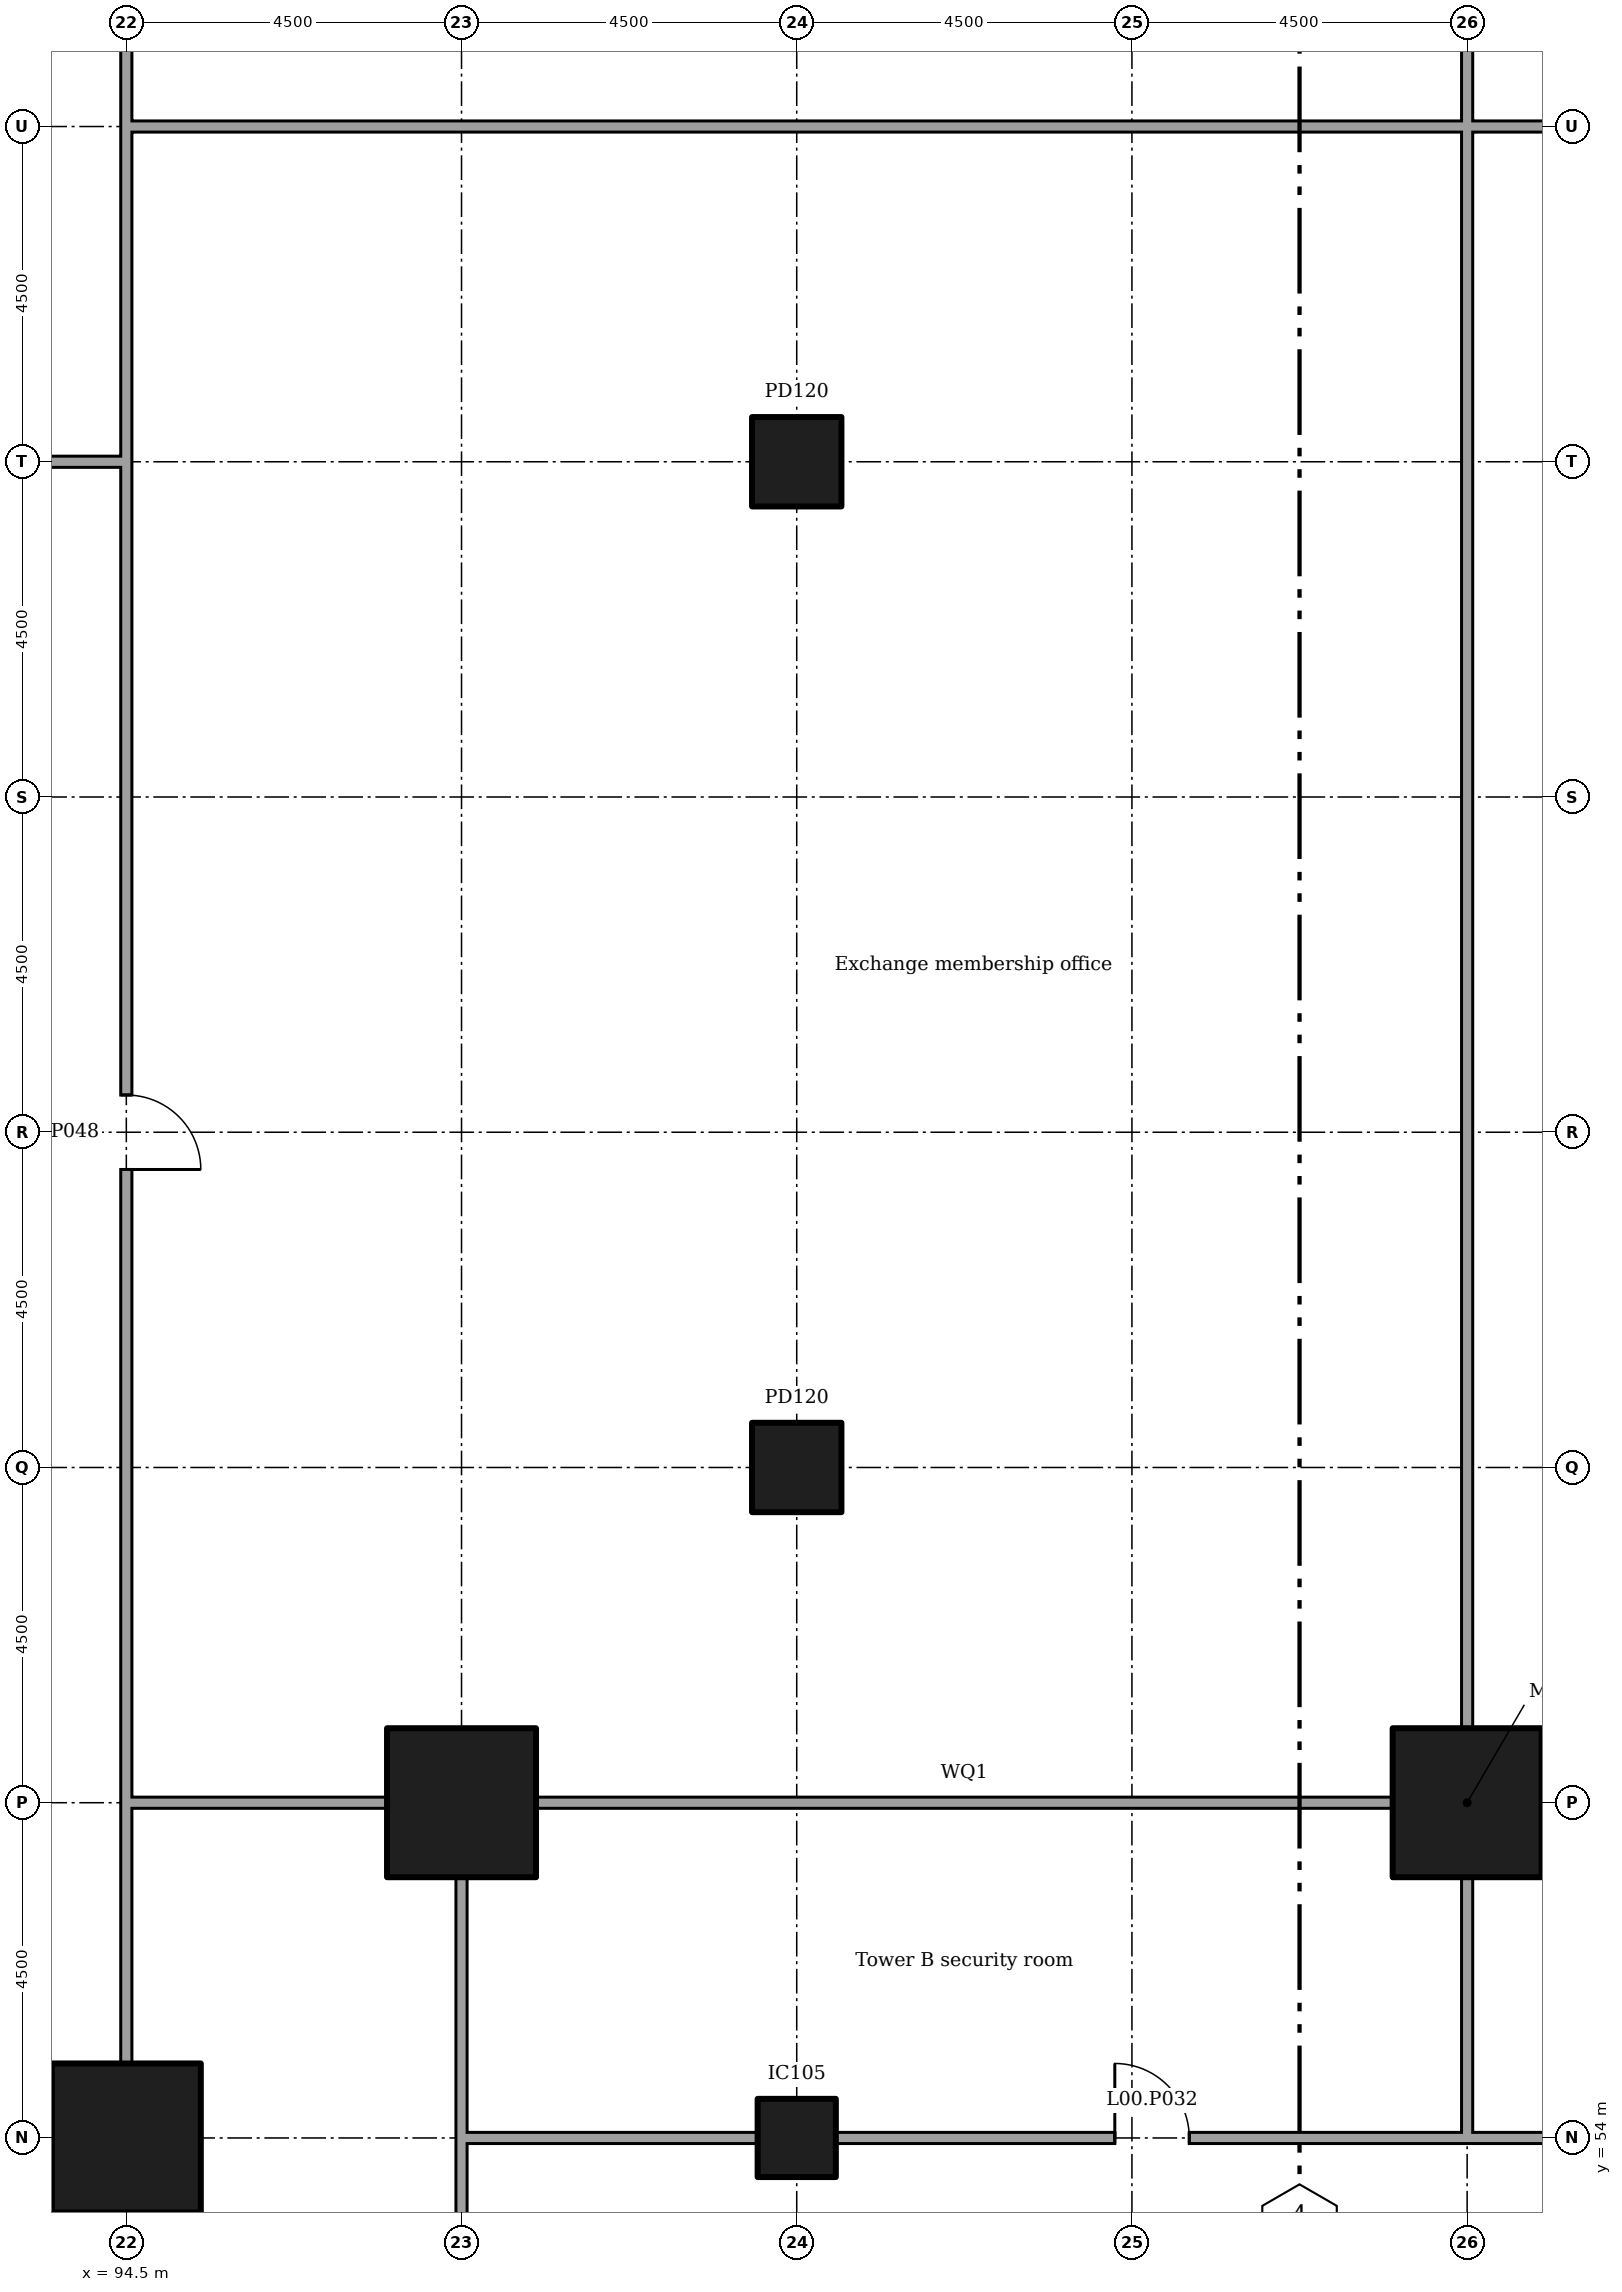
"""IFC4 building model, lengths in metres.
Left out: names, types, materials, properties, quantities, classifications, styles, units other than length and angle.
Written with IfcOpenShell. Run it as: python <this file> out.ifc"""

import sys

from ifc_helpers import new_model, si_unit, direction, frame, frame_2d, origin, origin_2d, place, context, subcontext, project, spatial, rectangle, extrude, element, fill, save


model = new_model("IFC4")
c1 = context("Model", 3, precision=1e-05, world=origin(), true_north=direction((0.0, 1.0)))
c2 = subcontext(c1, "Body", "Model", "MODEL_VIEW")
j1 = project(units=[si_unit("LENGTHUNIT", "METRE"), si_unit("PLANEANGLEUNIT", "RADIAN")], contexts=[c1])
p1 = place(None, origin())
s1 = spatial("IfcSite", under=j1, at=p1, CompositionType="ELEMENT")
p2 = place(p1, origin())
s2 = spatial("IfcBuilding", under=s1, at=p2, CompositionType="ELEMENT")
p3 = place(p2, origin())
s3 = spatial("IfcBuildingStorey", under=s2, at=p3, CompositionType="ELEMENT", Elevation=0.0)
for number, where in (
    (1, (94.5, 54.0, 0.0)),
    (2, (99.0, 58.5, 0.0)),
    (3, (112.5, 58.5, 0.0)),
):
    element("IfcColumn", number, at=place(p3, frame(where)), inside=s3, PredefinedType="COLUMN", context=c2, shape_type="SweptSolid", body=[
        extrude(rectangle(XDim=2.0, YDim=2.0, at=origin_2d()), origin(), (0.0, 0.0, 1.0), 6.0),
    ])
p4 = place(p3, frame((103.5, 54.0, 0.0)))
e4 = element("IfcColumn", 4, at=p4, inside=s3, PredefinedType="COLUMN", context=c2, shape_type="SweptSolid", body=[
    extrude(rectangle(XDim=1.05, YDim=1.05, at=origin_2d()), origin(), (0.0, 0.0, 1.0), 6.0),
])
for number, where in (
    (5, (103.5, 63.0, 0.0)),
    (6, (103.5, 76.5, 0.0)),
):
    element("IfcColumn", number, at=place(p3, frame(where)), inside=s3, PredefinedType="COLUMN", context=c2, shape_type="SweptSolid", body=[
        extrude(rectangle(XDim=1.2, YDim=1.2, at=origin_2d()), origin(), (0.0, 0.0, 1.0), 6.0),
    ])
p5 = place(p3, frame((90.595, 76.5, 0.0)))
e7 = element("IfcWall", 7, at=p5, inside=s3, PredefinedType="PARTITIONING", context=c2, shape_type="SweptSolid", body=[
    extrude(rectangle(XDim=3.98, YDim=0.15, at=frame_2d((1.99, 0.0))), origin(), (0.0, 0.0, 1.0), 5.55),
])
p6 = place(p3, frame((94.5, 45.995, 0.0), z_axis=(0.0, 0.0, 1.0), x_axis=(0.0, 1.0, 0.0)))
e8 = element("IfcWall", 8, at=p6, inside=s3, PredefinedType="PARTITIONING", context=c2, shape_type="SweptSolid", body=[
    extrude(rectangle(XDim=7.01, YDim=0.15, at=frame_2d((3.505, 0.0))), origin(), (0.0, 0.0, 1.0), 5.55),
])
p7 = place(p6, frame((2.6, 0.0, 0.0)))
e9 = element("IfcOpeningElement", 9, at=p7, cuts=e8, PredefinedType="OPENING", context=c2, shape_type="SweptSolid", body=[
    extrude(rectangle(XDim=1.8, YDim=2.1, at=frame_2d((0.9, 1.05))), frame((0.0, 0.085, 0.0), z_axis=(0.0, -1.0, 0.0), x_axis=(1.0, 0.0, 0.0)), (0.0, 0.0, 1.0), 0.17),
])
p8 = place(p3, frame((94.5, 54.995, 0.0), z_axis=(0.0, 0.0, 1.0), x_axis=(0.0, 1.0, 0.0)))
e10 = element("IfcWall", 10, at=p8, inside=s3, PredefinedType="PARTITIONING", context=c2, shape_type="SweptSolid", body=[
    extrude(rectangle(XDim=3.58, YDim=0.15, at=frame_2d((1.79, 0.0))), origin(), (0.0, 0.0, 1.0), 5.55),
])
p9 = place(p3, frame((94.5, 58.5, 0.0), z_axis=(0.0, 0.0, 1.0), x_axis=(0.0, 1.0, 0.0)))
e11 = element("IfcWall", 11, at=p9, inside=s3, PredefinedType="PARTITIONING", context=c2, shape_type="SweptSolid", body=[
    extrude(rectangle(XDim=17.925, YDim=0.15, at=frame_2d((8.962, 0.0))), origin(), (0.0, 0.0, 1.0), 5.55),
])
p10 = place(p9, frame((8.5, 0.0, 0.0)))
e12 = element("IfcOpeningElement", 12, at=p10, cuts=e11, PredefinedType="OPENING", context=c2, shape_type="SweptSolid", body=[
    extrude(rectangle(XDim=1.0, YDim=2.1, at=frame_2d((0.5, 1.05))), frame((0.0, 0.085, 0.0), z_axis=(0.0, -1.0, 0.0), x_axis=(1.0, 0.0, 0.0)), (0.0, 0.0, 1.0), 0.17),
])
p11 = place(p3, frame((94.5, 76.5, 0.0), z_axis=(0.0, 0.0, 1.0), x_axis=(0.0, 1.0, 0.0)))
e13 = element("IfcWall", 13, at=p11, inside=s3, PredefinedType="PARTITIONING", context=c2, shape_type="SweptSolid", body=[
    extrude(rectangle(XDim=4.575, YDim=0.15, at=frame_2d((2.288, 0.0))), origin(), (0.0, 0.0, 1.0), 5.55),
])
p12 = place(p3, frame((94.5, 81.0, 0.0), z_axis=(0.0, 0.0, 1.0), x_axis=(0.0, 1.0, 0.0)))
e14 = element("IfcWall", 14, at=p12, inside=s3, PredefinedType="PARTITIONING", context=c2, shape_type="SweptSolid", body=[
    extrude(rectangle(XDim=9.075, YDim=0.15, at=frame_2d((4.538, 0.0))), origin(), (0.0, 0.0, 1.0), 5.55),
])
p13 = place(p12, frame((3.6, 0.0, 0.0)))
e15 = element("IfcOpeningElement", 15, at=p13, cuts=e14, PredefinedType="OPENING", context=c2, shape_type="SweptSolid", body=[
    extrude(rectangle(XDim=1.8, YDim=2.1, at=frame_2d((0.9, 1.05))), frame((0.0, 0.085, 0.0), z_axis=(0.0, -1.0, 0.0), x_axis=(1.0, 0.0, 0.0)), (0.0, 0.0, 1.0), 0.17),
])
p14 = place(p3, frame((99.0, 36.52, 0.0), z_axis=(0.0, 0.0, 1.0), x_axis=(0.0, 1.0, 0.0)))
e16 = element("IfcWall", 16, at=p14, inside=s3, PredefinedType="PARTITIONING", context=c2, shape_type="SweptSolid", body=[
    extrude(rectangle(XDim=17.555, YDim=0.15, at=frame_2d((8.777, 0.0))), origin(), (0.0, 0.0, 1.0), 5.55),
])
p15 = place(p14, frame((7.85, 0.0, 0.0)))
e17 = element("IfcOpeningElement", 17, at=p15, cuts=e16, PredefinedType="OPENING", context=c2, shape_type="SweptSolid", body=[
    extrude(rectangle(XDim=1.8, YDim=2.1, at=frame_2d((0.9, 1.05))), frame((0.0, 0.085, 0.0), z_axis=(0.0, -1.0, 0.0), x_axis=(1.0, 0.0, 0.0)), (0.0, 0.0, 1.0), 0.17),
])
p16 = place(p3, frame((99.0, 54.0, 0.0), z_axis=(0.0, 0.0, 1.0), x_axis=(0.0, 1.0, 0.0)))
e18 = element("IfcWall", 18, at=p16, inside=s3, PredefinedType="PARTITIONING", context=c2, shape_type="SweptSolid", body=[
    extrude(rectangle(XDim=3.505, YDim=0.15, at=frame_2d((1.752, 0.0))), origin(), (0.0, 0.0, 1.0), 5.55),
])
p17 = place(p3, frame((94.575, 58.5, 0.0)))
e19 = element("IfcWall", 19, at=p17, inside=s3, PredefinedType="PARTITIONING", context=c2, shape_type="SweptSolid", body=[
    extrude(rectangle(XDim=3.43, YDim=0.15, at=frame_2d((1.715, 0.0))), origin(), (0.0, 0.0, 1.0), 5.55),
])
p18 = place(p3, frame((99.075, 54.0, 0.0)))
e20 = element("IfcWall", 20, at=p18, inside=s3, PredefinedType="PARTITIONING", context=c2, shape_type="SweptSolid", body=[
    extrude(rectangle(XDim=3.905, YDim=0.15, at=frame_2d((1.953, 0.0))), origin(), (0.0, 0.0, 1.0), 5.55),
])
p19 = place(p3, frame((104.02, 54.0, 0.0)))
e21 = element("IfcWall", 21, at=p19, inside=s3, PredefinedType="PARTITIONING", context=c2, shape_type="SweptSolid", body=[
    extrude(rectangle(XDim=8.555, YDim=0.15, at=frame_2d((4.277, 0.0))), origin(), (0.0, 0.0, 1.0), 5.55),
])
p20 = place(p19, frame((3.75, 0.0, 0.0)))
e22 = element("IfcOpeningElement", 22, at=p20, cuts=e21, PredefinedType="OPENING", context=c2, shape_type="SweptSolid", body=[
    extrude(rectangle(XDim=1.0, YDim=2.1, at=frame_2d((0.5, 1.05))), frame((0.0, 0.085, 0.0), z_axis=(0.0, -1.0, 0.0), x_axis=(1.0, 0.0, 0.0)), (0.0, 0.0, 1.0), 0.17),
])
p21 = place(p3, frame((112.5, 54.0, 0.0)))
e23 = element("IfcWall", 23, at=p21, inside=s3, PredefinedType="PARTITIONING", context=c2, shape_type="SweptSolid", body=[
    extrude(rectangle(XDim=9.075, YDim=0.15, at=frame_2d((4.538, 0.0))), origin(), (0.0, 0.0, 1.0), 5.55),
])
p22 = place(p21, frame((4.0, 0.0, 0.0)))
e24 = element("IfcOpeningElement", 24, at=p22, cuts=e23, PredefinedType="OPENING", context=c2, shape_type="SweptSolid", body=[
    extrude(rectangle(XDim=1.0, YDim=2.1, at=frame_2d((0.5, 1.05))), frame((0.0, 0.085, 0.0), z_axis=(0.0, -1.0, 0.0), x_axis=(1.0, 0.0, 0.0)), (0.0, 0.0, 1.0), 0.17),
])
p23 = place(p3, frame((112.5, 54.075, 0.0), z_axis=(0.0, 0.0, 1.0), x_axis=(0.0, 1.0, 0.0)))
e25 = element("IfcWall", 25, at=p23, inside=s3, PredefinedType="PARTITIONING", context=c2, shape_type="SweptSolid", body=[
    extrude(rectangle(XDim=3.43, YDim=0.15, at=frame_2d((1.715, 0.0))), origin(), (0.0, 0.0, 1.0), 5.55),
])
p24 = place(p3, frame((99.995, 58.5, 0.0)))
e26 = element("IfcWall", 26, at=p24, inside=s3, PredefinedType="PARTITIONING", context=c2, shape_type="SweptSolid", body=[
    extrude(rectangle(XDim=11.51, YDim=0.15, at=frame_2d((5.755, 0.0))), origin(), (0.0, 0.0, 1.0), 5.55),
])
p25 = place(p3, frame((113.495, 58.5, 0.0)))
e27 = element("IfcWall", 27, at=p25, inside=s3, PredefinedType="PARTITIONING", context=c2, shape_type="SweptSolid", body=[
    extrude(rectangle(XDim=7.01, YDim=0.15, at=frame_2d((3.505, 0.0))), origin(), (0.0, 0.0, 1.0), 5.55),
])
p26 = place(p3, frame((112.5, 59.495, 0.0), z_axis=(0.0, 0.0, 1.0), x_axis=(0.0, 1.0, 0.0)))
e28 = element("IfcWall", 28, at=p26, inside=s3, PredefinedType="PARTITIONING", context=c2, shape_type="SweptSolid", body=[
    extrude(rectangle(XDim=21.58, YDim=0.15, at=frame_2d((10.79, 0.0))), origin(), (0.0, 0.0, 1.0), 5.55),
])
p27 = place(p3, frame((94.575, 81.0, 0.0)))
e29 = element("IfcWall", 29, at=p27, inside=s3, PredefinedType="PARTITIONING", context=c2, shape_type="SweptSolid", body=[
    extrude(rectangle(XDim=17.85, YDim=0.15, at=frame_2d((8.925, 0.0))), origin(), (0.0, 0.0, 1.0), 5.55),
])
p28 = place(p3, frame((112.425, 81.0, 0.0)))
e30 = element("IfcWall", 30, at=p28, inside=s3, PredefinedType="PARTITIONING", context=c2, shape_type="SweptSolid", body=[
    extrude(rectangle(XDim=22.5, YDim=0.15, at=frame_2d((11.25, 0.0))), origin(), (0.0, 0.0, 1.0), 5.55),
])
p29 = place(p3, frame((112.5, 81.075, 0.0), z_axis=(0.0, 0.0, 1.0), x_axis=(0.0, 1.0, 0.0)))
e31 = element("IfcWall", 31, at=p29, inside=s3, PredefinedType="PARTITIONING", context=c2, shape_type="SweptSolid", body=[
    extrude(rectangle(XDim=4.5, YDim=0.15, at=frame_2d((2.25, 0.0))), origin(), (0.0, 0.0, 1.0), 5.55),
])
p30 = place(p29, frame((1.275, 0.0, 0.0)))
e32 = element("IfcOpeningElement", 32, at=p30, cuts=e31, PredefinedType="OPENING", context=c2, shape_type="SweptSolid", body=[
    extrude(rectangle(XDim=1.8, YDim=2.1, at=frame_2d((0.9, 1.05))), frame((0.0, 0.085, 0.0), z_axis=(0.0, -1.0, 0.0), x_axis=(1.0, 0.0, 0.0)), (0.0, 0.0, 1.0), 0.17),
])
p31 = place(p20, origin())
e33 = element("IfcDoor", 33, at=p31, inside=s3, OperationType="SINGLE_SWING_RIGHT", PredefinedType="DOOR", context=c2, shape_type="SweptSolid", body=[
    extrude(rectangle(XDim=1.0, YDim=2.1, at=frame_2d((0.5, 1.05))), frame((0.0, 0.025, 0.0), z_axis=(0.0, -1.0, 0.0), x_axis=(1.0, 0.0, 0.0)), (0.0, 0.0, 1.0), 0.05),
])
fill(e22, e33)
p32 = place(p10, frame((1.0, 0.0, 0.0), x_axis=(-1.0, 0.0, 0.0)))
e34 = element("IfcDoor", 34, at=p32, inside=s3, OperationType="SINGLE_SWING_LEFT", PredefinedType="DOOR", context=c2, shape_type="SweptSolid", body=[
    extrude(rectangle(XDim=1.0, YDim=2.1, at=frame_2d((0.5, 1.05))), frame((0.0, 0.025, 0.0), z_axis=(0.0, -1.0, 0.0), x_axis=(1.0, 0.0, 0.0)), (0.0, 0.0, 1.0), 0.05),
])
fill(e12, e34)
save(model, sys.argv[1])
